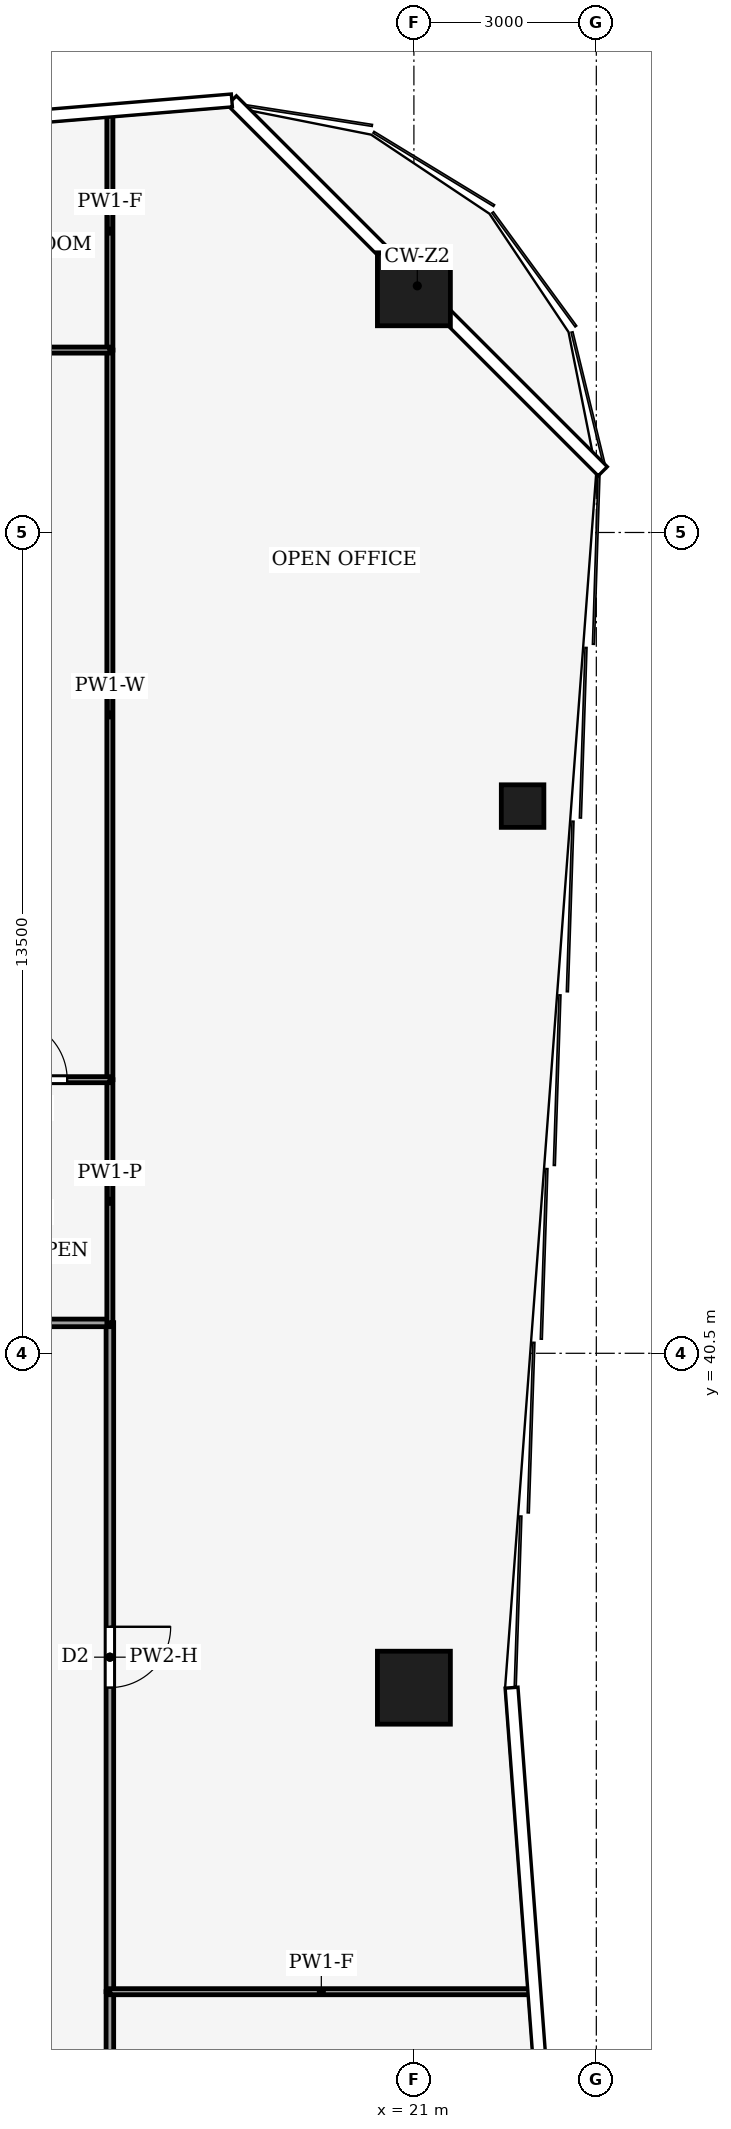
"""IFC4 building model, lengths in metres.
Left out: names, types, materials, properties, quantities, classifications, styles, units other than length and angle.
Written with IfcOpenShell. Run it as: python <this file> out.ifc"""

import sys

from ifc_helpers import new_model, si_unit, direction, frame, frame_2d, origin, origin_2d, place, context, subcontext, project, spatial, rectangle, hollow_rectangle, extrude, element, fill, save


model = new_model("IFC4")
c1 = context("Model", 3, precision=1e-05, world=origin(), true_north=direction((0.0, 1.0)))
c2 = subcontext(c1, "Body", "Model", "MODEL_VIEW")
j1 = project(units=[si_unit("LENGTHUNIT", "METRE"), si_unit("PLANEANGLEUNIT", "RADIAN")], contexts=[c1])
p1 = place(None, origin())
s1 = spatial("IfcSite", under=j1, at=p1, CompositionType="ELEMENT")
p2 = place(p1, origin())
s2 = spatial("IfcBuilding", under=s1, at=p2, CompositionType="ELEMENT")
p3 = place(p2, frame((0.0, 0.0, 146.0)))
s3 = spatial("IfcBuildingStorey", under=s2, at=p3, CompositionType="ELEMENT", Elevation=146.0)
for number, where, z_axis, x_axis in (
    (1, (21.0, 58.0, 0.0), (0.0, 0.0, 1.0), (1.0, 0.0, 0.0)),
    (2, (21.0, 35.0, 0.0), (0.0, 0.0, 1.0), (1.0, 0.0, 0.0)),
):
    element("IfcColumn", number, at=place(p3, frame(where, z_axis=z_axis, x_axis=x_axis)), inside=s3, PredefinedType="COLUMN", context=c2, shape_type="SweptSolid", body=[
        extrude(hollow_rectangle(XDim=1.2, YDim=1.2, WallThickness=0.07, at=origin_2d()), origin(), (0.0, 0.0, 1.0), 4.0),
    ])
p4 = place(p3, frame((22.788, 49.5, 0.0), z_axis=(0.0, 0.0, 1.0), x_axis=(1.0, 0.0, 0.0)))
e3 = element("IfcColumn", 3, at=p4, inside=s3, PredefinedType="COLUMN", context=c2, shape_type="SweptSolid", body=[
    extrude(hollow_rectangle(XDim=0.7, YDim=0.7, WallThickness=0.03, at=origin_2d()), origin(), (0.0, 0.0, 1.0), 4.0),
])
p5 = place(p3, frame((16.0, 30.0, 0.0), z_axis=(0.0, 0.0, 1.0), x_axis=(0.0, -1.0, 0.0)))
e4 = element("IfcWall", 4, at=p5, inside=s3, PredefinedType="PARTITIONING", context=c2, shape_type="SweptSolid", body=[
    extrude(rectangle(XDim=3.0, YDim=0.125, at=frame_2d((1.5, 0.0))), origin(), (0.0, 0.0, 1.0), 3.48),
])
p6 = place(p5, frame((1.05, 0.0, 0.0)))
e5 = element("IfcOpeningElement", 5, at=p6, cuts=e4, PredefinedType="OPENING", context=c2, shape_type="SweptSolid", body=[
    extrude(rectangle(XDim=0.9, YDim=2.1, at=frame_2d((0.45, 1.05))), frame((0.0, 0.073, 0.0), z_axis=(0.0, -1.0, 0.0), x_axis=(1.0, 0.0, 0.0)), (0.0, 0.0, 1.0), 0.145),
])
p7 = place(p3, frame((16.0, 41.004, 0.0), z_axis=(0.0, 0.0, 1.0), x_axis=(0.0, -1.0, 0.0)))
e6 = element("IfcWall", 6, at=p7, inside=s3, PredefinedType="PARTITIONING", context=c2, shape_type="SweptSolid", body=[
    extrude(rectangle(XDim=11.004, YDim=0.125, at=frame_2d((5.502, 0.0))), origin(), (0.0, 0.0, 1.0), 3.14),
])
p8 = place(p7, frame((5.002, 0.0, 0.0)))
e7 = element("IfcOpeningElement", 7, at=p8, cuts=e6, PredefinedType="OPENING", context=c2, shape_type="SweptSolid", body=[
    extrude(rectangle(XDim=1.0, YDim=2.1, at=frame_2d((0.5, 1.05))), frame((0.0, 0.073, 0.0), z_axis=(0.0, -1.0, 0.0), x_axis=(1.0, 0.0, 0.0)), (0.0, 0.0, 1.0), 0.145),
])
p9 = place(p3, frame((12.0, 41.0, 0.0), z_axis=(0.0, 0.0, 1.0), x_axis=(1.0, 0.0, 0.0)))
e8 = element("IfcWall", 8, at=p9, inside=s3, PredefinedType="PARTITIONING", context=c2, shape_type="SweptSolid", body=[
    extrude(rectangle(XDim=4.0, YDim=0.125, at=frame_2d((2.0, 0.0))), origin(), (0.0, 0.0, 1.0), 3.44),
])
p10 = place(p9, frame((1.5, 0.0, 0.0)))
e9 = element("IfcOpeningElement", 9, at=p10, cuts=e8, PredefinedType="OPENING", context=c2, shape_type="SweptSolid", body=[
    extrude(rectangle(XDim=1.0, YDim=2.1, at=frame_2d((0.5, 1.05))), frame((0.0, 0.073, 0.0), z_axis=(0.0, -1.0, 0.0), x_axis=(1.0, 0.0, 0.0)), (0.0, 0.0, 1.0), 0.145),
])
p11 = place(p3, frame((22.955, 30.0, 0.0), z_axis=(0.0, 0.0, 1.0), x_axis=(-1.0, 0.0, 0.0)))
e10 = element("IfcWall", 10, at=p11, inside=s3, PredefinedType="PARTITIONING", context=c2, shape_type="SweptSolid", body=[
    extrude(rectangle(XDim=6.955, YDim=0.1, at=frame_2d((3.478, 0.0))), origin(), (0.0, 0.0, 1.0), 3.04),
])
p12 = place(p3, frame((16.0, 45.0, 0.0), z_axis=(0.0, 0.0, 1.0), x_axis=(0.0, -1.0, 0.0)))
e11 = element("IfcWall", 11, at=p12, inside=s3, PredefinedType="PARTITIONING", context=c2, shape_type="SweptSolid", body=[
    extrude(rectangle(XDim=4.0, YDim=0.1, at=frame_2d((2.0, 0.0))), origin(), (0.0, 0.0, 1.0), 3.44),
])
p13 = place(p3, frame((16.0, 57.0, 0.0), z_axis=(0.0, 0.0, 1.0), x_axis=(0.0, -1.0, 0.0)))
e12 = element("IfcWall", 12, at=p13, inside=s3, PredefinedType="PARTITIONING", context=c2, shape_type="SweptSolid", body=[
    extrude(rectangle(XDim=12.0, YDim=0.1, at=frame_2d((6.0, 0.0))), origin(), (0.0, 0.0, 1.0), 3.24),
])
p14 = place(p3, frame((16.0, 60.913, 0.0), z_axis=(0.0, 0.0, 1.0), x_axis=(0.0, -1.0, 0.0)))
e13 = element("IfcWall", 13, at=p14, inside=s3, PredefinedType="PARTITIONING", context=c2, shape_type="SweptSolid", body=[
    extrude(rectangle(XDim=3.913, YDim=0.1, at=frame_2d((1.957, 0.0))), origin(), (0.0, 0.0, 1.0), 3.04),
])
p15 = place(p3, frame((11.996, 45.0, 0.0), z_axis=(0.0, 0.0, 1.0), x_axis=(1.0, 0.0, 0.0)))
e14 = element("IfcWall", 14, at=p15, inside=s3, PredefinedType="PARTITIONING", context=c2, shape_type="SweptSolid", body=[
    extrude(rectangle(XDim=4.004, YDim=0.1, at=frame_2d((2.002, 0.0))), origin(), (0.0, 0.0, 1.0), 3.87),
])
p16 = place(p15, frame((2.302, 0.0, 0.0)))
e15 = element("IfcOpeningElement", 15, at=p16, cuts=e14, PredefinedType="OPENING", context=c2, shape_type="SweptSolid", body=[
    extrude(rectangle(XDim=1.0, YDim=2.1, at=frame_2d((0.5, 1.05))), frame((0.0, 0.06, 0.0), z_axis=(0.0, -1.0, 0.0), x_axis=(1.0, 0.0, 0.0)), (0.0, 0.0, 1.0), 0.12),
])
p17 = place(p3, frame((6.0, 57.0, 0.0), z_axis=(0.0, 0.0, 1.0), x_axis=(1.0, 0.0, 0.0)))
e16 = element("IfcWall", 16, at=p17, inside=s3, PredefinedType="PARTITIONING", context=c2, shape_type="SweptSolid", body=[
    extrude(rectangle(XDim=10.0, YDim=0.1, at=frame_2d((5.0, 0.0))), origin(), (0.0, 0.0, 1.0), 3.44),
])
p18 = place(p17, frame((2.5, 0.0, 0.0)))
e17 = element("IfcOpeningElement", 17, at=p18, cuts=e16, PredefinedType="OPENING", context=c2, shape_type="SweptSolid", body=[
    extrude(rectangle(XDim=1.0, YDim=2.1, at=frame_2d((0.5, 1.05))), frame((0.0, 0.06, 0.0), z_axis=(0.0, -1.0, 0.0), x_axis=(1.0, 0.0, 0.0)), (0.0, 0.0, 1.0), 0.12),
])
p19 = place(p8, origin())
e18 = element("IfcDoor", 18, at=p19, inside=s3, OperationType="SINGLE_SWING_RIGHT", PredefinedType="DOOR", context=c2, shape_type="SweptSolid", body=[
    extrude(rectangle(XDim=1.0, YDim=2.1, at=frame_2d((0.5, 1.05))), frame((0.0, 0.025, 0.0), z_axis=(0.0, -1.0, 0.0), x_axis=(1.0, 0.0, 0.0)), (0.0, 0.0, 1.0), 0.05),
])
fill(e7, e18)
p20 = place(p16, origin())
e19 = element("IfcDoor", 19, at=p20, inside=s3, OperationType="SINGLE_SWING_RIGHT", PredefinedType="DOOR", context=c2, shape_type="SweptSolid", body=[
    extrude(rectangle(XDim=1.0, YDim=2.1, at=frame_2d((0.5, 1.05))), frame((0.0, 0.025, 0.0), z_axis=(0.0, -1.0, 0.0), x_axis=(1.0, 0.0, 0.0)), (0.0, 0.0, 1.0), 0.05),
])
fill(e15, e19)
save(model, sys.argv[1])
